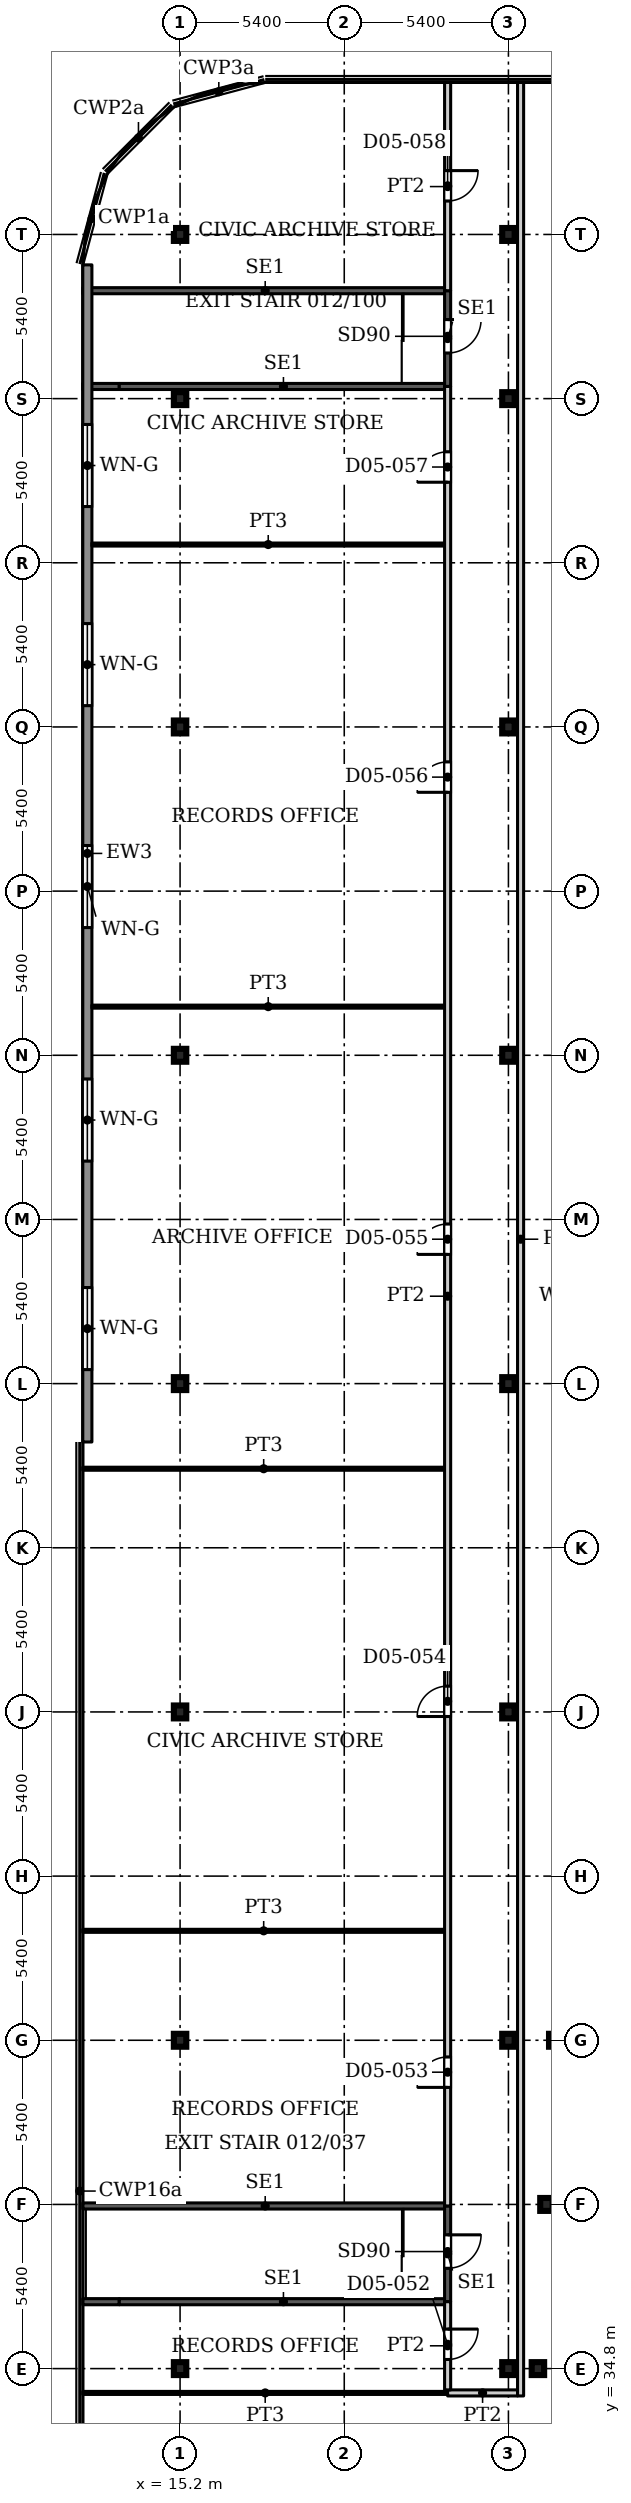
"""IFC4 building model, lengths in metres.
Left out: names, types, materials, properties, quantities, classifications, styles, units other than length and angle.
Written with IfcOpenShell. Run it as: python <this file> out.ifc"""

import sys

from ifc_helpers import new_model, si_unit, direction, frame, frame_2d, origin, origin_2d, place, context, subcontext, project, spatial, rectangle, i_section, extrude, source, transform, mapped, element, fill, save


model = new_model("IFC4")
c1 = context("Model", 3, precision=1e-05, world=origin(), true_north=direction((0.0, 1.0)))
c2 = subcontext(c1, "Body", "Model", "MODEL_VIEW")
j1 = project(units=[si_unit("LENGTHUNIT", "METRE"), si_unit("PLANEANGLEUNIT", "RADIAN")], contexts=[c1])
p1 = place(None, origin())
s1 = spatial("IfcSite", under=j1, at=p1, CompositionType="ELEMENT")
p2 = place(p1, origin())
s2 = spatial("IfcBuilding", under=s1, at=p2, CompositionType="ELEMENT")
p3 = place(p2, frame((0.0, 0.0, 26.0)))
s3 = spatial("IfcBuildingStorey", under=s2, at=p3, CompositionType="ELEMENT", Elevation=26.0)
for number, where, z_axis, x_axis in (
    (1, (15.2, 34.8, 0.0), (0.0, 0.0, 1.0), (1.0, 0.0, 0.0)),
    (2, (26.0, 34.8, 0.0), (0.0, 0.0, 1.0), (1.0, 0.0, 0.0)),
    (3, (15.2, 45.6, 0.0), (0.0, 0.0, 1.0), (1.0, 0.0, 0.0)),
    (4, (26.0, 45.6, 0.0), (0.0, 0.0, 1.0), (1.0, 0.0, 0.0)),
    (5, (15.2, 56.4, 0.0), (0.0, 0.0, 1.0), (1.0, 0.0, 0.0)),
    (6, (26.0, 56.4, 0.0), (0.0, 0.0, 1.0), (1.0, 0.0, 0.0)),
    (7, (15.2, 67.2, 0.0), (0.0, 0.0, 1.0), (1.0, 0.0, 0.0)),
    (8, (26.0, 67.2, 0.0), (0.0, 0.0, 1.0), (1.0, 0.0, 0.0)),
    (9, (15.2, 78.0, 0.0), (0.0, 0.0, 1.0), (1.0, 0.0, 0.0)),
    (10, (26.0, 78.0, 0.0), (0.0, 0.0, 1.0), (1.0, 0.0, 0.0)),
    (11, (15.2, 88.8, 0.0), (0.0, 0.0, 1.0), (1.0, 0.0, 0.0)),
    (12, (26.0, 88.8, 0.0), (0.0, 0.0, 1.0), (1.0, 0.0, 0.0)),
    (13, (15.2, 99.6, 0.0), (0.0, 0.0, 1.0), (1.0, 0.0, 0.0)),
    (14, (26.0, 99.6, 0.0), (0.0, 0.0, 1.0), (1.0, 0.0, 0.0)),
    (15, (15.2, 105.0, 0.0), (0.0, 0.0, 1.0), (1.0, 0.0, 0.0)),
    (16, (26.0, 105.0, 0.0), (0.0, 0.0, 1.0), (1.0, 0.0, 0.0)),
    (17, (26.97, 34.8, 0.0), (0.0, 0.0, 1.0), (1.0, 0.0, 0.0)),
    (18, (27.25, 40.2, 0.0), (0.0, 0.0, 1.0), (1.0, 0.0, 0.0)),
    (19, (27.54, 45.6, 0.0), (0.0, 0.0, 1.0), (1.0, 0.0, 0.0)),
):
    element("IfcColumn", number, at=place(p3, frame(where, z_axis=z_axis, x_axis=x_axis)), inside=s3, PredefinedType="COLUMN", context=c2, shape_type="SweptSolid", body=[
        extrude(i_section(OverallWidth=0.409, OverallDepth=0.425, WebThickness=0.033, FlangeThickness=0.052, FilletRadius=0.013, at=origin_2d()), origin(), (0.0, 0.0, 1.0), 4.5),
    ])
p4 = place(p3, frame((12.15, 65.28, 0.0), z_axis=(0.0, 0.0, 1.0), x_axis=(0.0, 1.0, 0.0)))
e20 = element("IfcWall", 20, at=p4, inside=s3, PredefinedType="SOLIDWALL", context=c2, shape_type="SweptSolid", body=[
    extrude(rectangle(XDim=38.72, YDim=0.3, at=frame_2d((19.36, 0.0))), origin(), (0.0, 0.0, 1.0), 4.25),
])
p5 = place(p4, frame((2.38, 0.0, 2.4)))
e21 = element("IfcOpeningElement", 21, at=p5, cuts=e20, PredefinedType="OPENING", context=c2, shape_type="SweptSolid", body=[
    extrude(rectangle(XDim=2.7, YDim=1.2, at=frame_2d((1.35, 0.6))), frame((0.0, 0.16, 0.0), z_axis=(0.0, -1.0, 0.0), x_axis=(1.0, 0.0, 0.0)), (0.0, 0.0, 1.0), 0.32),
])
p6 = place(p4, frame((9.24, 0.0, 2.4)))
e22 = element("IfcOpeningElement", 22, at=p6, cuts=e20, PredefinedType="OPENING", context=c2, shape_type="SweptSolid", body=[
    extrude(rectangle(XDim=2.7, YDim=1.2, at=frame_2d((1.35, 0.6))), frame((0.0, 0.16, 0.0), z_axis=(0.0, -1.0, 0.0), x_axis=(1.0, 0.0, 0.0)), (0.0, 0.0, 1.0), 0.32),
])
p7 = place(p4, frame((16.92, 0.0, 2.4)))
e23 = element("IfcOpeningElement", 23, at=p7, cuts=e20, PredefinedType="OPENING", context=c2, shape_type="SweptSolid", body=[
    extrude(rectangle(XDim=2.7, YDim=1.2, at=frame_2d((1.35, 0.6))), frame((0.0, 0.16, 0.0), z_axis=(0.0, -1.0, 0.0), x_axis=(1.0, 0.0, 0.0)), (0.0, 0.0, 1.0), 0.32),
])
p8 = place(p4, frame((24.22, 0.0, 2.4)))
e24 = element("IfcOpeningElement", 24, at=p8, cuts=e20, PredefinedType="OPENING", context=c2, shape_type="SweptSolid", body=[
    extrude(rectangle(XDim=2.7, YDim=1.2, at=frame_2d((1.35, 0.6))), frame((0.0, 0.16, 0.0), z_axis=(0.0, -1.0, 0.0), x_axis=(1.0, 0.0, 0.0)), (0.0, 0.0, 1.0), 0.32),
])
p9 = place(p4, frame((30.77, 0.0, 2.4)))
e25 = element("IfcOpeningElement", 25, at=p9, cuts=e20, PredefinedType="OPENING", context=c2, shape_type="SweptSolid", body=[
    extrude(rectangle(XDim=2.7, YDim=1.2, at=frame_2d((1.35, 0.6))), frame((0.0, 0.16, 0.0), z_axis=(0.0, -1.0, 0.0), x_axis=(1.0, 0.0, 0.0)), (0.0, 0.0, 1.0), 0.32),
])
p10 = place(p3, frame((12.0, 37.0, 0.0), z_axis=(0.0, 0.0, 1.0), x_axis=(1.0, 0.0, 0.0)))
e26 = element("IfcWall", 26, at=p10, inside=s3, PredefinedType="SHEAR", context=c2, shape_type="SweptSolid", body=[
    extrude(rectangle(XDim=1.2, YDim=0.2, at=frame_2d((0.6, 0.0))), origin(), (0.0, 0.0, 1.0), 4.5),
])
p11 = place(p3, frame((13.2, 37.0, 0.0), z_axis=(0.0, 0.0, 1.0), x_axis=(1.0, 0.0, 0.0)))
e27 = element("IfcWall", 27, at=p11, inside=s3, PredefinedType="SHEAR", context=c2, shape_type="SweptSolid", body=[
    extrude(rectangle(XDim=10.8, YDim=0.2, at=frame_2d((5.4, 0.0))), origin(), (0.0, 0.0, 1.0), 4.5),
])
p12 = place(p3, frame((12.0, 40.15, 0.0), z_axis=(0.0, 0.0, 1.0), x_axis=(1.0, 0.0, 0.0)))
e28 = element("IfcWall", 28, at=p12, inside=s3, PredefinedType="SHEAR", context=c2, shape_type="SweptSolid", body=[
    extrude(rectangle(XDim=12.0, YDim=0.2, at=frame_2d((6.0, 0.0))), origin(), (0.0, 0.0, 1.0), 4.5),
])
p13 = place(p3, frame((24.0, 37.0, 0.0), z_axis=(0.0, 0.0, 1.0), x_axis=(0.0, 1.0, 0.0)))
e29 = element("IfcWall", 29, at=p13, inside=s3, PredefinedType="SHEAR", context=c2, shape_type="SweptSolid", body=[
    extrude(rectangle(XDim=3.15, YDim=0.2, at=frame_2d((1.575, 0.0))), origin(), (0.0, 0.0, 1.0), 4.5),
])
p14 = place(p13, frame((1.1, 0.0, 0.0)))
e30 = element("IfcOpeningElement", 30, at=p14, cuts=e29, PredefinedType="OPENING", context=c2, shape_type="SweptSolid", body=[
    extrude(rectangle(XDim=1.1, YDim=2.2, at=frame_2d((0.55, 1.1))), frame((0.0, 0.11, 0.0), z_axis=(0.0, -1.0, 0.0), x_axis=(1.0, 0.0, 0.0)), (0.0, 0.0, 1.0), 0.22),
])
p15 = place(p3, frame((12.0, 100.0, 0.0), z_axis=(0.0, 0.0, 1.0), x_axis=(1.0, 0.0, 0.0)))
e31 = element("IfcWall", 31, at=p15, inside=s3, PredefinedType="SHEAR", context=c2, shape_type="SweptSolid", body=[
    extrude(rectangle(XDim=1.2, YDim=0.2, at=frame_2d((0.6, 0.0))), origin(), (0.0, 0.0, 1.0), 4.5),
])
p16 = place(p3, frame((13.2, 100.0, 0.0), z_axis=(0.0, 0.0, 1.0), x_axis=(1.0, 0.0, 0.0)))
e32 = element("IfcWall", 32, at=p16, inside=s3, PredefinedType="SHEAR", context=c2, shape_type="SweptSolid", body=[
    extrude(rectangle(XDim=10.8, YDim=0.2, at=frame_2d((5.4, 0.0))), origin(), (0.0, 0.0, 1.0), 4.5),
])
p17 = place(p3, frame((12.0, 103.15, 0.0), z_axis=(0.0, 0.0, 1.0), x_axis=(1.0, 0.0, 0.0)))
e33 = element("IfcWall", 33, at=p17, inside=s3, PredefinedType="SHEAR", context=c2, shape_type="SweptSolid", body=[
    extrude(rectangle(XDim=12.0, YDim=0.2, at=frame_2d((6.0, 0.0))), origin(), (0.0, 0.0, 1.0), 4.5),
])
p18 = place(p3, frame((24.0, 100.0, 0.0), z_axis=(0.0, 0.0, 1.0), x_axis=(0.0, 1.0, 0.0)))
e34 = element("IfcWall", 34, at=p18, inside=s3, PredefinedType="SHEAR", context=c2, shape_type="SweptSolid", body=[
    extrude(rectangle(XDim=3.15, YDim=0.2, at=frame_2d((1.575, 0.0))), origin(), (0.0, 0.0, 1.0), 4.5),
])
p19 = place(p18, frame((1.1, 0.0, 0.0)))
e35 = element("IfcOpeningElement", 35, at=p19, cuts=e34, PredefinedType="OPENING", context=c2, shape_type="SweptSolid", body=[
    extrude(rectangle(XDim=1.1, YDim=2.2, at=frame_2d((0.55, 1.1))), frame((0.0, 0.11, 0.0), z_axis=(0.0, -1.0, 0.0), x_axis=(1.0, 0.0, 0.0)), (0.0, 0.0, 1.0), 0.22),
])
p20 = place(p3, frame((12.0, 34.0, 0.0), z_axis=(0.0, 0.0, 1.0), x_axis=(1.0, 0.0, 0.0)))
e36 = element("IfcWall", 36, at=p20, inside=s3, PredefinedType="PARTITIONING", context=c2, shape_type="SweptSolid", body=[
    extrude(rectangle(XDim=12.0, YDim=0.1, at=frame_2d((6.0, 0.0))), origin(), (0.0, 0.0, 1.0), 4.2),
])
for number, where, z_axis, x_axis in (
    (37, (12.0, 49.2, 0.0), (0.0, 0.0, 1.0), (1.0, 0.0, 0.0)),
    (38, (12.0, 64.4, 0.0), (0.0, 0.0, 1.0), (1.0, 0.0, 0.0)),
):
    element("IfcWall", number, at=place(p3, frame(where, z_axis=z_axis, x_axis=x_axis)), inside=s3, PredefinedType="PARTITIONING", context=c2, shape_type="SweptSolid", body=[
        extrude(rectangle(XDim=11.9, YDim=0.1, at=frame_2d((5.95, 0.0))), origin(), (0.0, 0.0, 1.0), 4.2),
    ])
for number, where, z_axis, x_axis in (
    (39, (12.299, 79.6, 0.0), (0.0, 0.0, 1.0), (1.0, 0.0, 0.0)),
    (40, (12.299, 94.8, 0.0), (0.0, 0.0, 1.0), (1.0, 0.0, 0.0)),
):
    element("IfcWall", number, at=place(p3, frame(where, z_axis=z_axis, x_axis=x_axis)), inside=s3, PredefinedType="PARTITIONING", context=c2, shape_type="SweptSolid", body=[
        extrude(rectangle(XDim=11.601, YDim=0.1, at=frame_2d((5.8, 0.0))), origin(), (0.0, 0.0, 1.0), 4.2),
    ])
p21 = place(p3, frame((24.0, 34.0, 0.0), z_axis=(0.0, 0.0, 1.0), x_axis=(1.0, 0.0, 0.0)))
e41 = element("IfcWall", 41, at=p21, inside=s3, PredefinedType="PARTITIONING", context=c2, shape_type="SweptSolid", body=[
    extrude(rectangle(XDim=2.3, YDim=0.2, at=frame_2d((1.15, 0.0))), origin(), (0.0, 0.0, 1.0), 4.2),
])
p22 = place(p3, frame((24.0, 34.1, 0.0), z_axis=(0.0, 0.0, 1.0), x_axis=(0.0, 1.0, 0.0)))
e42 = element("IfcWall", 42, at=p22, inside=s3, PredefinedType="PARTITIONING", context=c2, shape_type="SweptSolid", body=[
    extrude(rectangle(XDim=2.9, YDim=0.2, at=frame_2d((1.45, 0.0))), origin(), (0.0, 0.0, 1.0), 4.2),
])
p23 = place(p22, frame((1.0, 0.0, 0.0)))
e43 = element("IfcOpeningElement", 43, at=p23, cuts=e42, PredefinedType="OPENING", context=c2, shape_type="SweptSolid", body=[
    extrude(rectangle(XDim=1.0, YDim=2.1, at=frame_2d((0.5, 1.05))), frame((0.0, 0.11, 0.0), z_axis=(0.0, -1.0, 0.0), x_axis=(1.0, 0.0, 0.0)), (0.0, 0.0, 1.0), 0.22),
])
p24 = place(p3, frame((24.0, 40.15, 0.0), z_axis=(0.0, 0.0, 1.0), x_axis=(0.0, 1.0, 0.0)))
e44 = element("IfcWall", 44, at=p24, inside=s3, PredefinedType="PARTITIONING", context=c2, shape_type="SweptSolid", body=[
    extrude(rectangle(XDim=59.85, YDim=0.2, at=frame_2d((29.925, 0.0))), origin(), (0.0, 0.0, 1.0), 4.2),
])
p25 = place(p24, frame((3.9, 0.0, 0.0)))
e45 = element("IfcOpeningElement", 45, at=p25, cuts=e44, PredefinedType="OPENING", context=c2, shape_type="SweptSolid", body=[
    extrude(rectangle(XDim=1.0, YDim=2.1, at=frame_2d((0.5, 1.05))), frame((0.0, 0.11, 0.0), z_axis=(0.0, -1.0, 0.0), x_axis=(1.0, 0.0, 0.0)), (0.0, 0.0, 1.0), 0.22),
])
p26 = place(p24, frame((16.1, 0.0, 0.0)))
e46 = element("IfcOpeningElement", 46, at=p26, cuts=e44, PredefinedType="OPENING", context=c2, shape_type="SweptSolid", body=[
    extrude(rectangle(XDim=1.0, YDim=2.1, at=frame_2d((0.5, 1.05))), frame((0.0, 0.11, 0.0), z_axis=(0.0, -1.0, 0.0), x_axis=(1.0, 0.0, 0.0)), (0.0, 0.0, 1.0), 0.22),
])
p27 = place(p24, frame((31.3, 0.0, 0.0)))
e47 = element("IfcOpeningElement", 47, at=p27, cuts=e44, PredefinedType="OPENING", context=c2, shape_type="SweptSolid", body=[
    extrude(rectangle(XDim=1.0, YDim=2.1, at=frame_2d((0.5, 1.05))), frame((0.0, 0.11, 0.0), z_axis=(0.0, -1.0, 0.0), x_axis=(1.0, 0.0, 0.0)), (0.0, 0.0, 1.0), 0.22),
])
p28 = place(p24, frame((46.5, 0.0, 0.0)))
e48 = element("IfcOpeningElement", 48, at=p28, cuts=e44, PredefinedType="OPENING", context=c2, shape_type="SweptSolid", body=[
    extrude(rectangle(XDim=1.0, YDim=2.1, at=frame_2d((0.5, 1.05))), frame((0.0, 0.11, 0.0), z_axis=(0.0, -1.0, 0.0), x_axis=(1.0, 0.0, 0.0)), (0.0, 0.0, 1.0), 0.22),
])
p29 = place(p24, frame((56.7, 0.0, 0.0)))
e49 = element("IfcOpeningElement", 49, at=p29, cuts=e44, PredefinedType="OPENING", context=c2, shape_type="SweptSolid", body=[
    extrude(rectangle(XDim=1.0, YDim=2.1, at=frame_2d((0.5, 1.05))), frame((0.0, 0.11, 0.0), z_axis=(0.0, -1.0, 0.0), x_axis=(1.0, 0.0, 0.0)), (0.0, 0.0, 1.0), 0.22),
])
p30 = place(p3, frame((24.0, 103.15, 0.0), z_axis=(0.0, 0.0, 1.0), x_axis=(0.0, 1.0, 0.0)))
e50 = element("IfcWall", 50, at=p30, inside=s3, PredefinedType="PARTITIONING", context=c2, shape_type="SweptSolid", body=[
    extrude(rectangle(XDim=6.85, YDim=0.2, at=frame_2d((3.425, 0.0))), origin(), (0.0, 0.0, 1.0), 4.2),
])
p31 = place(p30, frame((2.95, 0.0, 0.0)))
e51 = element("IfcOpeningElement", 51, at=p31, cuts=e50, PredefinedType="OPENING", context=c2, shape_type="SweptSolid", body=[
    extrude(rectangle(XDim=1.0, YDim=2.1, at=frame_2d((0.5, 1.05))), frame((0.0, 0.11, 0.0), z_axis=(0.0, -1.0, 0.0), x_axis=(1.0, 0.0, 0.0)), (0.0, 0.0, 1.0), 0.22),
])
p32 = place(p3, frame((26.4, 33.9, 0.0), z_axis=(0.0, 0.0, 1.0), x_axis=(0.0, 1.0, 0.0)))
e52 = element("IfcWall", 52, at=p32, inside=s3, PredefinedType="PARTITIONING", context=c2, shape_type="SweptSolid", body=[
    extrude(rectangle(XDim=76.1, YDim=0.2, at=frame_2d((38.05, 0.0))), origin(), (0.0, 0.0, 1.0), 4.2),
])
m1 = source(origin(), c2, "Body", "SweptSolid", [
    extrude(rectangle(XDim=2.7, YDim=1.2, at=frame_2d((1.35, 0.6))), frame((0.0, 0.03, 0.0), z_axis=(0.0, -1.0, 0.0), x_axis=(1.0, 0.0, 0.0)), (0.0, 0.0, 1.0), 0.06),
])
p33 = place(p5, origin())
e53 = element("IfcWindow", 53, at=p33, inside=s3, PartitioningType="SINGLE_PANEL", PredefinedType="WINDOW", context=c2, shape_type="MappedRepresentation", body=[
    mapped(m1, transform((0.0, 0.0, 0.0), x_axis=(1.0, 0.0, 0.0), y_axis=(0.0, 1.0, 0.0), z_axis=(0.0, 0.0, 1.0), scale=1.0)),
])
fill(e21, e53)
p34 = place(p6, origin())
e54 = element("IfcWindow", 54, at=p34, inside=s3, PartitioningType="SINGLE_PANEL", PredefinedType="WINDOW", context=c2, shape_type="MappedRepresentation", body=[
    mapped(m1, transform((0.0, 0.0, 0.0), x_axis=(1.0, 0.0, 0.0), y_axis=(0.0, 1.0, 0.0), z_axis=(0.0, 0.0, 1.0), scale=1.0)),
])
fill(e22, e54)
p35 = place(p7, origin())
e55 = element("IfcWindow", 55, at=p35, inside=s3, PartitioningType="SINGLE_PANEL", PredefinedType="WINDOW", context=c2, shape_type="MappedRepresentation", body=[
    mapped(m1, transform((0.0, 0.0, 0.0), x_axis=(1.0, 0.0, 0.0), y_axis=(0.0, 1.0, 0.0), z_axis=(0.0, 0.0, 1.0), scale=1.0)),
])
fill(e23, e55)
p36 = place(p8, origin())
e56 = element("IfcWindow", 56, at=p36, inside=s3, PartitioningType="SINGLE_PANEL", PredefinedType="WINDOW", context=c2, shape_type="MappedRepresentation", body=[
    mapped(m1, transform((0.0, 0.0, 0.0), x_axis=(1.0, 0.0, 0.0), y_axis=(0.0, 1.0, 0.0), z_axis=(0.0, 0.0, 1.0), scale=1.0)),
])
fill(e24, e56)
p37 = place(p9, origin())
e57 = element("IfcWindow", 57, at=p37, inside=s3, PartitioningType="SINGLE_PANEL", PredefinedType="WINDOW", context=c2, shape_type="MappedRepresentation", body=[
    mapped(m1, transform((0.0, 0.0, 0.0), x_axis=(1.0, 0.0, 0.0), y_axis=(0.0, 1.0, 0.0), z_axis=(0.0, 0.0, 1.0), scale=1.0)),
])
fill(e25, e57)
m2 = source(origin(), c2, "Body", "SweptSolid", [
    extrude(rectangle(XDim=1.1, YDim=2.2, at=frame_2d((0.55, 1.1))), frame((0.0, 0.025, 0.0), z_axis=(0.0, -1.0, 0.0), x_axis=(1.0, 0.0, 0.0)), (0.0, 0.0, 1.0), 0.05),
])
p38 = place(p14, origin())
e58 = element("IfcDoor", 58, at=p38, inside=s3, OperationType="SINGLE_SWING_RIGHT", PredefinedType="DOOR", context=c2, shape_type="MappedRepresentation", body=[
    mapped(m2, transform((0.0, 0.0, 0.0), x_axis=(1.0, 0.0, 0.0), y_axis=(0.0, 1.0, 0.0), z_axis=(0.0, 0.0, 1.0), scale=1.0)),
])
fill(e30, e58)
p39 = place(p19, origin())
e59 = element("IfcDoor", 59, at=p39, inside=s3, OperationType="SINGLE_SWING_RIGHT", PredefinedType="DOOR", context=c2, shape_type="MappedRepresentation", body=[
    mapped(m2, transform((0.0, 0.0, 0.0), x_axis=(1.0, 0.0, 0.0), y_axis=(0.0, 1.0, 0.0), z_axis=(0.0, 0.0, 1.0), scale=1.0)),
])
fill(e35, e59)
m3 = source(origin(), c2, "Body", "SweptSolid", [
    extrude(rectangle(XDim=1.0, YDim=2.1, at=frame_2d((0.5, 1.05))), frame((0.0, 0.025, 0.0), z_axis=(0.0, -1.0, 0.0), x_axis=(1.0, 0.0, 0.0)), (0.0, 0.0, 1.0), 0.05),
])
p40 = place(p23, origin())
e60 = element("IfcDoor", 60, at=p40, inside=s3, OperationType="SINGLE_SWING_RIGHT", PredefinedType="DOOR", context=c2, shape_type="MappedRepresentation", body=[
    mapped(m3, transform((0.0, 0.0, 0.0), x_axis=(1.0, 0.0, 0.0), y_axis=(0.0, 1.0, 0.0), z_axis=(0.0, 0.0, 1.0), scale=1.0)),
])
fill(e43, e60)
p41 = place(p25, origin())
e61 = element("IfcDoor", 61, at=p41, inside=s3, OperationType="SINGLE_SWING_LEFT", PredefinedType="DOOR", context=c2, shape_type="MappedRepresentation", body=[
    mapped(m3, transform((0.0, 0.0, 0.0), x_axis=(1.0, 0.0, 0.0), y_axis=(0.0, 1.0, 0.0), z_axis=(0.0, 0.0, 1.0), scale=1.0)),
])
fill(e45, e61)
p42 = place(p26, origin())
e62 = element("IfcDoor", 62, at=p42, inside=s3, OperationType="SINGLE_SWING_LEFT", PredefinedType="DOOR", context=c2, shape_type="MappedRepresentation", body=[
    mapped(m3, transform((0.0, 0.0, 0.0), x_axis=(1.0, 0.0, 0.0), y_axis=(0.0, 1.0, 0.0), z_axis=(0.0, 0.0, 1.0), scale=1.0)),
])
fill(e46, e62)
p43 = place(p27, origin())
e63 = element("IfcDoor", 63, at=p43, inside=s3, OperationType="SINGLE_SWING_LEFT", PredefinedType="DOOR", context=c2, shape_type="MappedRepresentation", body=[
    mapped(m3, transform((0.0, 0.0, 0.0), x_axis=(1.0, 0.0, 0.0), y_axis=(0.0, 1.0, 0.0), z_axis=(0.0, 0.0, 1.0), scale=1.0)),
])
fill(e47, e63)
p44 = place(p28, origin())
e64 = element("IfcDoor", 64, at=p44, inside=s3, OperationType="SINGLE_SWING_LEFT", PredefinedType="DOOR", context=c2, shape_type="MappedRepresentation", body=[
    mapped(m3, transform((0.0, 0.0, 0.0), x_axis=(1.0, 0.0, 0.0), y_axis=(0.0, 1.0, 0.0), z_axis=(0.0, 0.0, 1.0), scale=1.0)),
])
fill(e48, e64)
p45 = place(p29, origin())
e65 = element("IfcDoor", 65, at=p45, inside=s3, OperationType="SINGLE_SWING_LEFT", PredefinedType="DOOR", context=c2, shape_type="MappedRepresentation", body=[
    mapped(m3, transform((0.0, 0.0, 0.0), x_axis=(1.0, 0.0, 0.0), y_axis=(0.0, 1.0, 0.0), z_axis=(0.0, 0.0, 1.0), scale=1.0)),
])
fill(e49, e65)
p46 = place(p31, origin())
e66 = element("IfcDoor", 66, at=p46, inside=s3, OperationType="SINGLE_SWING_RIGHT", PredefinedType="DOOR", context=c2, shape_type="MappedRepresentation", body=[
    mapped(m3, transform((0.0, 0.0, 0.0), x_axis=(1.0, 0.0, 0.0), y_axis=(0.0, 1.0, 0.0), z_axis=(0.0, 0.0, 1.0), scale=1.0)),
])
fill(e51, e66)
save(model, sys.argv[1])
